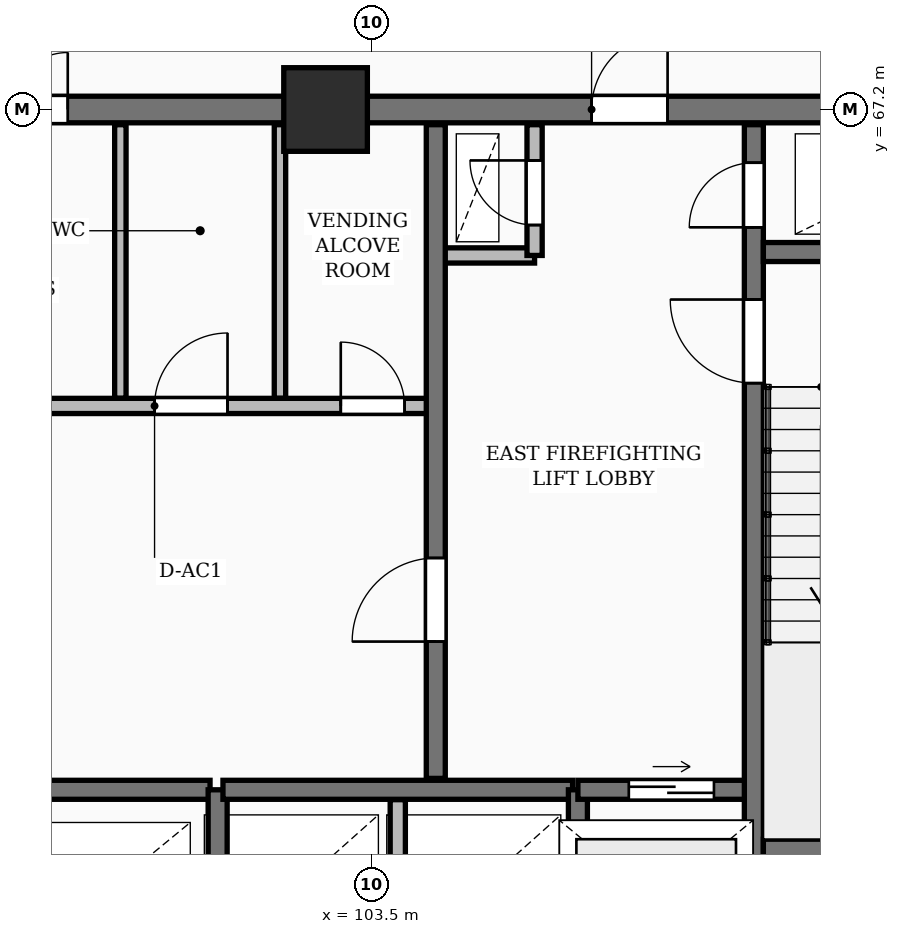
"""IFC4 building model, lengths in metres.
Left out: names, types, materials, properties, quantities, classifications, styles, units other than length and angle.
Written with IfcOpenShell. Run it as: python <this file> out.ifc"""

import sys

from ifc_helpers import new_model, si_unit, direction, frame, frame_2d, origin, origin_2d, place, context, subcontext, project, spatial, rectangle, extrude, element, fill, save


model = new_model("IFC4")
c1 = context("Model", 3, precision=1e-05, world=origin(), true_north=direction((0.0, 1.0)))
c2 = subcontext(c1, "Body", "Model", "MODEL_VIEW")
j1 = project(units=[si_unit("LENGTHUNIT", "METRE"), si_unit("PLANEANGLEUNIT", "RADIAN")], contexts=[c1])
p1 = place(None, origin())
s1 = spatial("IfcSite", under=j1, at=p1, CompositionType="ELEMENT")
p2 = place(p1, origin())
s2 = spatial("IfcBuilding", under=s1, at=p2, CompositionType="ELEMENT")
p3 = place(p2, frame((0.0, 0.0, 5.4)))
s3 = spatial("IfcBuildingStorey", under=s2, at=p3, CompositionType="ELEMENT", Elevation=5.4)
p4 = place(p3, frame((102.9, 67.2, 0.0), z_axis=(0.0, 0.0, 1.0), x_axis=(1.0, 0.0, 0.0)))
e1 = element("IfcColumn", 1, at=p4, inside=s3, PredefinedType="COLUMN", context=c2, shape_type="SweptSolid", body=[
    extrude(rectangle(XDim=1.1, YDim=1.1, at=origin_2d()), origin(), (0.0, 0.0, 1.0), 4.6),
])
p5 = place(p3, frame((75.95, 67.2, 0.0), z_axis=(0.0, 0.0, 1.0), x_axis=(1.0, 0.0, 0.0)))
e2 = element("IfcWall", 2, at=p5, inside=s3, PredefinedType="SHEAR", context=c2, shape_type="SweptSolid", body=[
    extrude(rectangle(XDim=36.3, YDim=0.35, at=frame_2d((18.15, 0.0))), origin(), (0.0, 0.0, 1.0), 4.6),
])
p6 = place(p5, frame((5.25, 0.0, 0.0)))
e3 = element("IfcOpeningElement", 3, at=p6, cuts=e2, PredefinedType="OPENING", context=c2, shape_type="SweptSolid", body=[
    extrude(rectangle(XDim=1.0, YDim=2.15, at=frame_2d((0.5, 1.075))), frame((0.0, 0.185, 0.0), z_axis=(0.0, -1.0, 0.0), x_axis=(1.0, 0.0, 0.0)), (0.0, 0.0, 1.0), 0.37),
])
p7 = place(p5, frame((22.058, 0.0, 0.0)))
e4 = element("IfcOpeningElement", 4, at=p7, cuts=e2, PredefinedType="OPENING", context=c2, shape_type="SweptSolid", body=[
    extrude(rectangle(XDim=1.5, YDim=2.2, at=frame_2d((0.75, 1.1))), frame((0.0, 0.185, 0.0), z_axis=(0.0, -1.0, 0.0), x_axis=(1.0, 0.0, 0.0)), (0.0, 0.0, 1.0), 0.37),
])
p8 = place(p5, frame((30.45, 0.0, 0.0)))
e5 = element("IfcOpeningElement", 5, at=p8, cuts=e2, PredefinedType="OPENING", context=c2, shape_type="SweptSolid", body=[
    extrude(rectangle(XDim=1.0, YDim=2.15, at=frame_2d((0.5, 1.075))), frame((0.0, 0.185, 0.0), z_axis=(0.0, -1.0, 0.0), x_axis=(1.0, 0.0, 0.0)), (0.0, 0.0, 1.0), 0.37),
])
p9 = place(p3, frame((93.02, 58.25, 0.0), z_axis=(0.0, 0.0, 1.0), x_axis=(1.0, 0.0, 0.0)))
e6 = element("IfcWall", 6, at=p9, inside=s3, PredefinedType="SHEAR", context=c2, shape_type="SweptSolid", body=[
    extrude(rectangle(XDim=8.36, YDim=0.25, at=frame_2d((4.18, 0.0))), origin(), (0.0, 0.0, 1.0), 4.6),
])
p10 = place(p3, frame((101.48, 55.4, 0.0), z_axis=(0.0, 0.0, 1.0), x_axis=(0.0, 1.0, 0.0)))
e7 = element("IfcWall", 7, at=p10, inside=s3, PredefinedType="SHEAR", context=c2, shape_type="SweptSolid", body=[
    extrude(rectangle(XDim=2.85, YDim=0.25, at=frame_2d((1.425, 0.0))), origin(), (0.0, 0.0, 1.0), 4.6),
])
p11 = place(p3, frame((103.85, 55.4, 0.0), z_axis=(0.0, 0.0, 1.0), x_axis=(0.0, 1.0, 0.0)))
e8 = element("IfcWall", 8, at=p11, inside=s3, PredefinedType="PARTITIONING", context=c2, shape_type="SweptSolid", body=[
    extrude(rectangle(XDim=2.72, YDim=0.2, at=frame_2d((1.36, 0.0))), origin(), (0.0, 0.0, 1.0), 4.3),
])
p12 = place(p3, frame((101.55, 58.25, 0.0), z_axis=(0.0, 0.0, 1.0), x_axis=(1.0, 0.0, 0.0)))
e9 = element("IfcWall", 9, at=p12, inside=s3, PredefinedType="SHEAR", context=c2, shape_type="SweptSolid", body=[
    extrude(rectangle(XDim=4.6, YDim=0.25, at=frame_2d((2.3, 0.0))), origin(), (0.0, 0.0, 1.0), 4.6),
])
p13 = place(p3, frame((106.22, 55.4, 0.0), z_axis=(0.0, 0.0, 1.0), x_axis=(0.0, 1.0, 0.0)))
e10 = element("IfcWall", 10, at=p13, inside=s3, PredefinedType="SHEAR", context=c2, shape_type="SweptSolid", body=[
    extrude(rectangle(XDim=2.85, YDim=0.25, at=frame_2d((1.425, 0.0))), origin(), (0.0, 0.0, 1.0), 4.6),
])
p14 = place(p3, frame((106.22, 58.25, 0.0), z_axis=(0.0, 0.0, 1.0), x_axis=(1.0, 0.0, 0.0)))
e11 = element("IfcWall", 11, at=p14, inside=s3, PredefinedType="SHEAR", context=c2, shape_type="SweptSolid", body=[
    extrude(rectangle(XDim=2.46, YDim=0.25, at=frame_2d((1.23, 0.0))), origin(), (0.0, 0.0, 1.0), 4.6),
])
p15 = place(p14, frame((0.67, 0.0, 0.0)))
e12 = element("IfcOpeningElement", 12, at=p15, cuts=e11, PredefinedType="OPENING", context=c2, shape_type="SweptSolid", body=[
    extrude(rectangle(XDim=1.12, YDim=2.12, at=frame_2d((0.56, 1.06))), frame((0.0, 0.135, 0.0), z_axis=(0.0, -1.0, 0.0), x_axis=(1.0, 0.0, 0.0)), (0.0, 0.0, 1.0), 0.27),
])
for number, where, z_axis, x_axis in (
    (13, (102.3, 63.4, 0.0), (0.0, 0.0, 1.0), (0.0, 1.0, 0.0)),
    (14, (100.2, 63.4, 0.0), (0.0, 0.0, 1.0), (0.0, 1.0, 0.0)),
):
    element("IfcWall", number, at=place(p3, frame(where, z_axis=z_axis, x_axis=x_axis)), inside=s3, PredefinedType="PARTITIONING", context=c2, shape_type="SweptSolid", body=[
        extrude(rectangle(XDim=3.6, YDim=0.15, at=frame_2d((1.8, 0.0))), origin(), (0.0, 0.0, 1.0), 4.3),
    ])
p16 = place(p3, frame((84.42, 63.3, 0.0), z_axis=(0.0, 0.0, 1.0), x_axis=(1.0, 0.0, 0.0)))
e15 = element("IfcWall", 15, at=p16, inside=s3, PredefinedType="PARTITIONING", context=c2, shape_type="SweptSolid", body=[
    extrude(rectangle(XDim=19.83, YDim=0.2, at=frame_2d((9.915, 0.0))), origin(), (0.0, 0.0, 1.0), 4.3),
])
p17 = place(p16, frame((1.15, 0.0, 0.0)))
e16 = element("IfcOpeningElement", 16, at=p17, cuts=e15, PredefinedType="OPENING", context=c2, shape_type="SweptSolid", body=[
    extrude(rectangle(XDim=0.85, YDim=2.05, at=frame_2d((0.425, 1.025))), frame((0.0, 0.11, 0.0), z_axis=(0.0, -1.0, 0.0), x_axis=(1.0, 0.0, 0.0)), (0.0, 0.0, 1.0), 0.22),
])
p18 = place(p16, frame((3.25, 0.0, 0.0)))
e17 = element("IfcOpeningElement", 17, at=p18, cuts=e15, PredefinedType="OPENING", context=c2, shape_type="SweptSolid", body=[
    extrude(rectangle(XDim=0.85, YDim=2.05, at=frame_2d((0.425, 1.025))), frame((0.0, 0.11, 0.0), z_axis=(0.0, -1.0, 0.0), x_axis=(1.0, 0.0, 0.0)), (0.0, 0.0, 1.0), 0.22),
])
p19 = place(p16, frame((13.08, 0.0, 0.0)))
e18 = element("IfcOpeningElement", 18, at=p19, cuts=e15, PredefinedType="OPENING", context=c2, shape_type="SweptSolid", body=[
    extrude(rectangle(XDim=1.5, YDim=2.2, at=frame_2d((0.75, 1.1))), frame((0.0, 0.11, 0.0), z_axis=(0.0, -1.0, 0.0), x_axis=(1.0, 0.0, 0.0)), (0.0, 0.0, 1.0), 0.22),
])
p20 = place(p16, frame((5.53, 0.0, 0.0)))
e19 = element("IfcOpeningElement", 19, at=p20, cuts=e15, PredefinedType="OPENING", context=c2, shape_type="SweptSolid", body=[
    extrude(rectangle(XDim=0.88, YDim=2.06, at=frame_2d((0.44, 1.03))), frame((0.0, 0.11, 0.0), z_axis=(0.0, -1.0, 0.0), x_axis=(1.0, 0.0, 0.0)), (0.0, 0.0, 1.0), 0.22),
])
p21 = place(p16, frame((7.68, 0.0, 0.0)))
e20 = element("IfcOpeningElement", 20, at=p21, cuts=e15, PredefinedType="OPENING", context=c2, shape_type="SweptSolid", body=[
    extrude(rectangle(XDim=0.88, YDim=2.06, at=frame_2d((0.44, 1.03))), frame((0.0, 0.11, 0.0), z_axis=(0.0, -1.0, 0.0), x_axis=(1.0, 0.0, 0.0)), (0.0, 0.0, 1.0), 0.22),
])
p22 = place(p16, frame((10.43, 0.0, 0.0)))
e21 = element("IfcOpeningElement", 21, at=p22, cuts=e15, PredefinedType="OPENING", context=c2, shape_type="SweptSolid", body=[
    extrude(rectangle(XDim=0.85, YDim=2.05, at=frame_2d((0.425, 1.025))), frame((0.0, 0.11, 0.0), z_axis=(0.0, -1.0, 0.0), x_axis=(1.0, 0.0, 0.0)), (0.0, 0.0, 1.0), 0.22),
])
p23 = place(p16, frame((16.23, 0.0, 0.0)))
e22 = element("IfcOpeningElement", 22, at=p23, cuts=e15, PredefinedType="OPENING", context=c2, shape_type="SweptSolid", body=[
    extrude(rectangle(XDim=0.96, YDim=2.1, at=frame_2d((0.48, 1.05))), frame((0.0, 0.11, 0.0), z_axis=(0.0, -1.0, 0.0), x_axis=(1.0, 0.0, 0.0)), (0.0, 0.0, 1.0), 0.22),
])
p24 = place(p16, frame((18.68, 0.0, 0.0)))
e23 = element("IfcOpeningElement", 23, at=p24, cuts=e15, PredefinedType="OPENING", context=c2, shape_type="SweptSolid", body=[
    extrude(rectangle(XDim=0.84, YDim=2.04, at=frame_2d((0.42, 1.02))), frame((0.0, 0.11, 0.0), z_axis=(0.0, -1.0, 0.0), x_axis=(1.0, 0.0, 0.0)), (0.0, 0.0, 1.0), 0.22),
])
p25 = place(p3, frame((104.45, 65.28, 0.0), z_axis=(0.0, 0.0, 1.0), x_axis=(1.0, 0.0, 0.0)))
e24 = element("IfcWall", 24, at=p25, inside=s3, PredefinedType="PARTITIONING", context=c2, shape_type="SweptSolid", body=[
    extrude(rectangle(XDim=1.2, YDim=0.2, at=frame_2d((0.6, 0.0))), origin(), (0.0, 0.0, 1.0), 4.3),
])
p26 = place(p3, frame((105.65, 65.28, 0.0), z_axis=(0.0, 0.0, 1.0), x_axis=(0.0, 1.0, 0.0)))
e25 = element("IfcWall", 25, at=p26, inside=s3, PredefinedType="PARTITIONING", context=c2, shape_type="SweptSolid", body=[
    extrude(rectangle(XDim=1.72, YDim=0.2, at=frame_2d((0.86, 0.0))), origin(), (0.0, 0.0, 1.0), 4.3),
])
p27 = place(p26, frame((0.4, 0.0, 0.0)))
e26 = element("IfcOpeningElement", 26, at=p27, cuts=e25, PredefinedType="OPENING", context=c2, shape_type="SweptSolid", body=[
    extrude(rectangle(XDim=0.85, YDim=2.05, at=frame_2d((0.425, 1.025))), frame((0.0, 0.11, 0.0), z_axis=(0.0, -1.0, 0.0), x_axis=(1.0, 0.0, 0.0)), (0.0, 0.0, 1.0), 0.22),
])
p28 = place(p3, frame((104.35, 58.4, 0.0), z_axis=(0.0, 0.0, 1.0), x_axis=(0.0, 1.0, 0.0)))
e27 = element("IfcWall", 27, at=p28, inside=s3, PredefinedType="SHEAR", context=c2, shape_type="SweptSolid", body=[
    extrude(rectangle(XDim=8.6, YDim=0.25, at=frame_2d((4.3, 0.0))), origin(), (0.0, 0.0, 1.0), 4.6),
])
p29 = place(p28, frame((1.8, 0.0, 0.0)))
e28 = element("IfcOpeningElement", 28, at=p29, cuts=e27, PredefinedType="OPENING", context=c2, shape_type="SweptSolid", body=[
    extrude(rectangle(XDim=1.1, YDim=2.1, at=frame_2d((0.55, 1.05))), frame((0.0, 0.135, 0.0), z_axis=(0.0, -1.0, 0.0), x_axis=(1.0, 0.0, 0.0)), (0.0, 0.0, 1.0), 0.27),
])
p30 = place(p3, frame((108.535, 55.4, 0.0), z_axis=(0.0, 0.0, 1.0), x_axis=(0.0, 1.0, 0.0)))
e29 = element("IfcWall", 29, at=p30, inside=s3, PredefinedType="SHEAR", context=c2, shape_type="SweptSolid", body=[
    extrude(rectangle(XDim=11.6, YDim=0.25, at=frame_2d((5.8, 0.0))), origin(), (0.0, 0.0, 1.0), 4.6),
])
p31 = place(p30, frame((8.2, 0.0, 0.0)))
e30 = element("IfcOpeningElement", 30, at=p31, cuts=e29, PredefinedType="OPENING", context=c2, shape_type="SweptSolid", body=[
    extrude(rectangle(XDim=1.1, YDim=2.1, at=frame_2d((0.55, 1.05))), frame((0.0, 0.135, 0.0), z_axis=(0.0, -1.0, 0.0), x_axis=(1.0, 0.0, 0.0)), (0.0, 0.0, 1.0), 0.27),
])
p32 = place(p30, frame((10.25, 0.0, 0.0)))
e31 = element("IfcOpeningElement", 31, at=p32, cuts=e29, PredefinedType="OPENING", context=c2, shape_type="SweptSolid", body=[
    extrude(rectangle(XDim=0.85, YDim=2.05, at=frame_2d((0.425, 1.025))), frame((0.0, 0.135, 0.0), z_axis=(0.0, -1.0, 0.0), x_axis=(1.0, 0.0, 0.0)), (0.0, 0.0, 1.0), 0.27),
])
for number, where, z_axis, x_axis in (
    (32, (108.66, 57.475, 0.0), (0.0, 0.0, 1.0), (1.0, 0.0, 0.0)),
    (33, (108.66, 65.325, 0.0), (0.0, 0.0, 1.0), (1.0, 0.0, 0.0)),
):
    element("IfcWall", number, at=place(p3, frame(where, z_axis=z_axis, x_axis=x_axis)), inside=s3, PredefinedType="SHEAR", context=c2, shape_type="SweptSolid", body=[
        extrude(rectangle(XDim=3.24, YDim=0.25, at=frame_2d((1.62, 0.0))), origin(), (0.0, 0.0, 1.0), 4.6),
    ])
p33 = place(p7, origin())
e34 = element("IfcDoor", 34, at=p33, inside=s3, OperationType="DOUBLE_DOOR_SINGLE_SWING", PredefinedType="DOOR", context=c2, shape_type="SweptSolid", body=[
    extrude(rectangle(XDim=1.5, YDim=2.2, at=frame_2d((0.75, 1.1))), frame((0.0, 0.025, 0.0), z_axis=(0.0, -1.0, 0.0), x_axis=(1.0, 0.0, 0.0)), (0.0, 0.0, 1.0), 0.05),
])
fill(e4, e34)
p34 = place(p8, origin())
e35 = element("IfcDoor", 35, at=p34, inside=s3, OperationType="SINGLE_SWING_RIGHT", PredefinedType="DOOR", context=c2, shape_type="SweptSolid", body=[
    extrude(rectangle(XDim=1.0, YDim=2.15, at=frame_2d((0.5, 1.075))), frame((0.0, 0.025, 0.0), z_axis=(0.0, -1.0, 0.0), x_axis=(1.0, 0.0, 0.0)), (0.0, 0.0, 1.0), 0.05),
])
fill(e5, e35)
p35 = place(p15, origin())
e36 = element("IfcDoor", 36, at=p35, inside=s3, OperationType="SLIDING_TO_RIGHT", PredefinedType="DOOR", context=c2, shape_type="SweptSolid", body=[
    extrude(rectangle(XDim=1.12, YDim=2.12, at=frame_2d((0.56, 1.06))), frame((0.0, 0.025, 0.0), z_axis=(0.0, -1.0, 0.0), x_axis=(1.0, 0.0, 0.0)), (0.0, 0.0, 1.0), 0.05),
])
fill(e12, e36)
p36 = place(p23, origin())
e37 = element("IfcDoor", 37, at=p36, inside=s3, OperationType="SINGLE_SWING_RIGHT", PredefinedType="DOOR", context=c2, shape_type="SweptSolid", body=[
    extrude(rectangle(XDim=0.96, YDim=2.1, at=frame_2d((0.48, 1.05))), frame((0.0, 0.025, 0.0), z_axis=(0.0, -1.0, 0.0), x_axis=(1.0, 0.0, 0.0)), (0.0, 0.0, 1.0), 0.05),
])
fill(e22, e37)
p37 = place(p24, origin())
e38 = element("IfcDoor", 38, at=p37, inside=s3, OperationType="SINGLE_SWING_LEFT", PredefinedType="DOOR", context=c2, shape_type="SweptSolid", body=[
    extrude(rectangle(XDim=0.84, YDim=2.04, at=frame_2d((0.42, 1.02))), frame((0.0, 0.025, 0.0), z_axis=(0.0, -1.0, 0.0), x_axis=(1.0, 0.0, 0.0)), (0.0, 0.0, 1.0), 0.05),
])
fill(e23, e38)
p38 = place(p27, origin())
e39 = element("IfcDoor", 39, at=p38, inside=s3, OperationType="SINGLE_SWING_RIGHT", PredefinedType="DOOR", context=c2, shape_type="SweptSolid", body=[
    extrude(rectangle(XDim=0.85, YDim=2.05, at=frame_2d((0.425, 1.025))), frame((0.0, 0.025, 0.0), z_axis=(0.0, -1.0, 0.0), x_axis=(1.0, 0.0, 0.0)), (0.0, 0.0, 1.0), 0.05),
])
fill(e26, e39)
p39 = place(p29, origin())
e40 = element("IfcDoor", 40, at=p39, inside=s3, OperationType="SINGLE_SWING_LEFT", PredefinedType="DOOR", context=c2, shape_type="SweptSolid", body=[
    extrude(rectangle(XDim=1.1, YDim=2.1, at=frame_2d((0.55, 1.05))), frame((0.0, 0.025, 0.0), z_axis=(0.0, -1.0, 0.0), x_axis=(1.0, 0.0, 0.0)), (0.0, 0.0, 1.0), 0.05),
])
fill(e28, e40)
p40 = place(p31, origin())
e41 = element("IfcDoor", 41, at=p40, inside=s3, OperationType="SINGLE_SWING_RIGHT", PredefinedType="DOOR", context=c2, shape_type="SweptSolid", body=[
    extrude(rectangle(XDim=1.1, YDim=2.1, at=frame_2d((0.55, 1.05))), frame((0.0, 0.025, 0.0), z_axis=(0.0, -1.0, 0.0), x_axis=(1.0, 0.0, 0.0)), (0.0, 0.0, 1.0), 0.05),
])
fill(e30, e41)
p41 = place(p32, origin())
e42 = element("IfcDoor", 42, at=p41, inside=s3, OperationType="SINGLE_SWING_LEFT", PredefinedType="DOOR", context=c2, shape_type="SweptSolid", body=[
    extrude(rectangle(XDim=0.85, YDim=2.05, at=frame_2d((0.425, 1.025))), frame((0.0, 0.025, 0.0), z_axis=(0.0, -1.0, 0.0), x_axis=(1.0, 0.0, 0.0)), (0.0, 0.0, 1.0), 0.05),
])
fill(e31, e42)
save(model, sys.argv[1])
